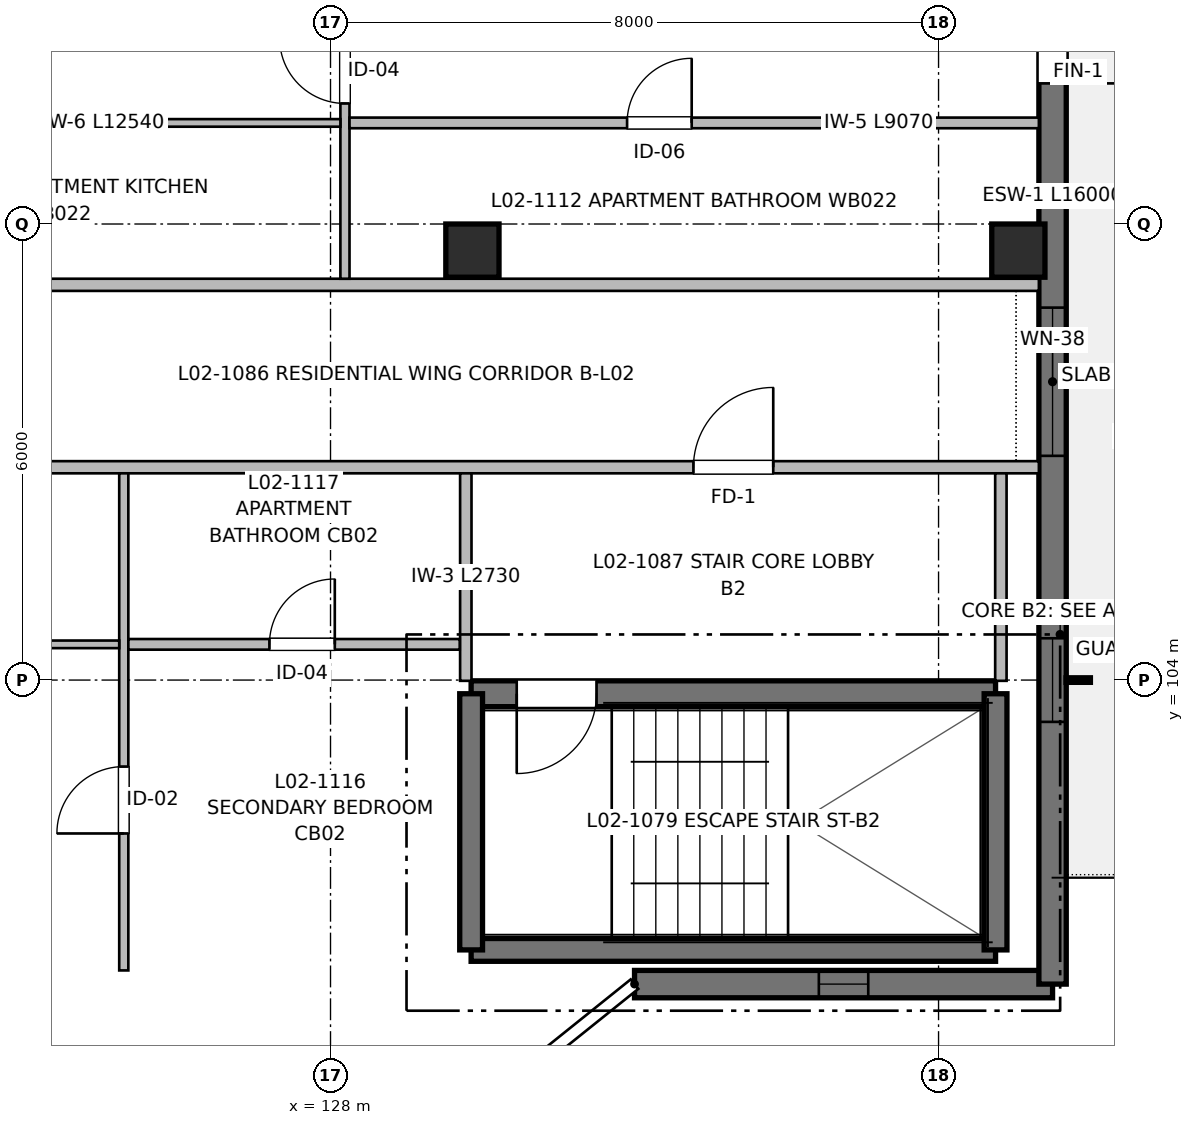
"""IFC4 building model, lengths in metres.
Left out: names, types, materials, properties, quantities, classifications, styles, units other than length and angle.
Written with IfcOpenShell. Run it as: python <this file> out.ifc"""

import sys

from ifc_helpers import new_model, si_unit, direction, frame, frame_2d, origin, origin_2d, place, context, subcontext, project, spatial, rectangle, extrude, element, fill, save


model = new_model("IFC4")
c1 = context("Model", 3, precision=1e-05, world=origin(), true_north=direction((0.0, 1.0)))
c2 = subcontext(c1, "Body", "Model", "MODEL_VIEW")
j1 = project(units=[si_unit("LENGTHUNIT", "METRE"), si_unit("PLANEANGLEUNIT", "RADIAN")], contexts=[c1])
p1 = place(None, origin())
s1 = spatial("IfcSite", under=j1, at=p1, CompositionType="ELEMENT")
p2 = place(p1, origin())
s2 = spatial("IfcBuilding", under=s1, at=p2, CompositionType="ELEMENT")
p3 = place(p2, frame((0.0, 0.0, 7.36)))
s3 = spatial("IfcBuildingStorey", under=s2, at=p3, CompositionType="ELEMENT", Elevation=7.36)
for number, where, z_axis, x_axis in (
    (1, (129.867, 109.65, 0.0), (0.0, 0.0, 1.0), (1.0, 0.0, 0.0)),
    (2, (137.05, 109.65, 0.0), (0.0, 0.0, 1.0), (1.0, 0.0, 0.0)),
):
    element("IfcColumn", number, at=place(p3, frame(where, z_axis=z_axis, x_axis=x_axis)), inside=s3, PredefinedType="COLUMN", context=c2, shape_type="SweptSolid", body=[
        extrude(rectangle(XDim=0.7, YDim=0.7, at=origin_2d()), origin(), (0.0, 0.0, 1.0), 3.2),
    ])
p4 = place(p3, frame((129.85, 100.45, 0.0), z_axis=(0.0, 0.0, 1.0), x_axis=(1.0, 0.0, 0.0)))
e3 = element("IfcWall", 3, at=p4, inside=s3, PredefinedType="SHEAR", context=c2, shape_type="SweptSolid", body=[
    extrude(rectangle(XDim=6.9, YDim=0.3, at=frame_2d((3.45, 0.0))), origin(), (0.0, 0.0, 1.0), 3.2),
])
p5 = place(p3, frame((136.75, 103.82, 0.0), z_axis=(0.0, 0.0, 1.0), x_axis=(-1.0, 0.0, 0.0)))
e4 = element("IfcWall", 4, at=p5, inside=s3, PredefinedType="SHEAR", context=c2, shape_type="SweptSolid", body=[
    extrude(rectangle(XDim=6.9, YDim=0.34, at=frame_2d((3.45, 0.0))), origin(), (0.0, 0.0, 1.0), 3.2),
])
p6 = place(p5, frame((5.25, 0.0, 0.0)))
e5 = element("IfcOpeningElement", 5, at=p6, cuts=e4, PredefinedType="OPENING", context=c2, shape_type="SweptSolid", body=[
    extrude(rectangle(XDim=1.05, YDim=2.15, at=frame_2d((0.525, 1.075))), frame((0.0, 0.18, 0.0), z_axis=(0.0, -1.0, 0.0), x_axis=(1.0, 0.0, 0.0)), (0.0, 0.0, 1.0), 0.36),
])
for number, where, z_axis, x_axis in (
    (6, (129.85, 103.82, 0.0), (0.0, 0.0, 1.0), (0.0, -1.0, 0.0)),
    (7, (136.75, 100.45, 0.0), (0.0, 0.0, 1.0), (0.0, 1.0, 0.0)),
):
    element("IfcWall", number, at=place(p3, frame(where, z_axis=z_axis, x_axis=x_axis)), inside=s3, PredefinedType="SHEAR", context=c2, shape_type="SweptSolid", body=[
        extrude(rectangle(XDim=3.37, YDim=0.3, at=frame_2d((1.685, 0.0))), origin(), (0.0, 0.0, 1.0), 3.2),
    ])
p7 = place(p3, frame((137.5, 100.0, 0.0), z_axis=(0.0, 0.0, 1.0), x_axis=(-1.0, 0.0, 0.0)))
e8 = element("IfcWall", 8, at=p7, inside=s3, PredefinedType="SHEAR", context=c2, shape_type="SweptSolid", body=[
    extrude(rectangle(XDim=5.5, YDim=0.36, at=frame_2d((2.75, 0.0))), origin(), (0.0, 0.0, 1.0), 2.98),
])
p8 = place(p7, frame((2.425, 0.0, 0.9)))
e9 = element("IfcOpeningElement", 9, at=p8, cuts=e8, PredefinedType="OPENING", context=c2, shape_type="SweptSolid", body=[
    extrude(rectangle(XDim=0.65, YDim=0.95, at=frame_2d((0.325, 0.475))), frame((0.0, 0.19, 0.0), z_axis=(0.0, -1.0, 0.0), x_axis=(1.0, 0.0, 0.0)), (0.0, 0.0, 1.0), 0.38),
])
p9 = place(p3, frame((137.5, 116.0, 0.0), z_axis=(0.0, 0.0, 1.0), x_axis=(0.0, -1.0, 0.0)))
e10 = element("IfcWall", 10, at=p9, inside=s3, PredefinedType="SHEAR", context=c2, shape_type="SweptSolid", body=[
    extrude(rectangle(XDim=16.0, YDim=0.36, at=frame_2d((8.0, 0.0))), origin(), (0.0, 0.0, 1.0), 2.98),
])
p10 = place(p9, frame((2.95, 0.0, 0.0)))
e11 = element("IfcOpeningElement", 11, at=p10, cuts=e10, PredefinedType="OPENING", context=c2, shape_type="SweptSolid", body=[
    extrude(rectangle(XDim=1.2, YDim=2.2, at=frame_2d((0.6, 1.1))), frame((0.0, 0.19, 0.0), z_axis=(0.0, -1.0, 0.0), x_axis=(1.0, 0.0, 0.0)), (0.0, 0.0, 1.0), 0.38),
])
p11 = place(p9, frame((7.1, 0.0, 0.72)))
e12 = element("IfcOpeningElement", 12, at=p11, cuts=e10, PredefinedType="OPENING", context=c2, shape_type="SweptSolid", body=[
    extrude(rectangle(XDim=1.95, YDim=1.5, at=frame_2d((0.975, 0.75))), frame((0.0, 0.19, 0.0), z_axis=(0.0, -1.0, 0.0), x_axis=(1.0, 0.0, 0.0)), (0.0, 0.0, 1.0), 0.38),
])
p12 = place(p9, frame((11.45, 0.0, 0.62)))
e13 = element("IfcOpeningElement", 13, at=p12, cuts=e10, PredefinedType="OPENING", context=c2, shape_type="SweptSolid", body=[
    extrude(rectangle(XDim=1.1, YDim=1.6, at=frame_2d((0.55, 0.8))), frame((0.0, 0.19, 0.0), z_axis=(0.0, -1.0, 0.0), x_axis=(1.0, 0.0, 0.0)), (0.0, 0.0, 1.0), 0.38),
])
p13 = place(p3, frame((113.2, 106.8, 0.0), z_axis=(0.0, 0.0, 1.0), x_axis=(1.0, 0.0, 0.0)))
e14 = element("IfcWall", 14, at=p13, inside=s3, PredefinedType="PARTITIONING", context=c2, shape_type="SweptSolid", body=[
    extrude(rectangle(XDim=24.12, YDim=0.16, at=frame_2d((12.06, 0.0))), origin(), (0.0, 0.0, 1.0), 2.935),
])
p14 = place(p13, frame((19.575, 0.0, 0.0)))
e15 = element("IfcOpeningElement", 15, at=p14, cuts=e14, PredefinedType="OPENING", context=c2, shape_type="SweptSolid", body=[
    extrude(rectangle(XDim=1.05, YDim=2.15, at=frame_2d((0.525, 1.075))), frame((0.0, 0.09, 0.0), z_axis=(0.0, -1.0, 0.0), x_axis=(1.0, 0.0, 0.0)), (0.0, 0.0, 1.0), 0.18),
])
p15 = place(p13, frame((8.995, 0.0, 0.0)))
e16 = element("IfcOpeningElement", 16, at=p15, cuts=e14, PredefinedType="OPENING", context=c2, shape_type="SweptSolid", body=[
    extrude(rectangle(XDim=0.98, YDim=2.15, at=frame_2d((0.49, 1.075))), frame((0.0, 0.09, 0.0), z_axis=(0.0, -1.0, 0.0), x_axis=(1.0, 0.0, 0.0)), (0.0, 0.0, 1.0), 0.18),
])
p16 = place(p3, frame((93.68, 109.2, 0.0), z_axis=(0.0, 0.0, 1.0), x_axis=(1.0, 0.0, 0.0)))
e17 = element("IfcWall", 17, at=p16, inside=s3, PredefinedType="PARTITIONING", context=c2, shape_type="SweptSolid", body=[
    extrude(rectangle(XDim=43.64, YDim=0.16, at=frame_2d((21.82, 0.0))), origin(), (0.0, 0.0, 1.0), 2.935),
])
p17 = place(p16, frame((5.41, 0.0, 0.0)))
e18 = element("IfcOpeningElement", 18, at=p17, cuts=e17, PredefinedType="OPENING", context=c2, shape_type="SweptSolid", body=[
    extrude(rectangle(XDim=0.98, YDim=2.15, at=frame_2d((0.49, 1.075))), frame((0.0, 0.09, 0.0), z_axis=(0.0, -1.0, 0.0), x_axis=(1.0, 0.0, 0.0)), (0.0, 0.0, 1.0), 0.18),
])
p18 = place(p16, frame((27.32, 0.0, 0.0)))
e19 = element("IfcOpeningElement", 19, at=p18, cuts=e17, PredefinedType="OPENING", context=c2, shape_type="SweptSolid", body=[
    extrude(rectangle(XDim=0.98, YDim=2.15, at=frame_2d((0.49, 1.075))), frame((0.0, 0.09, 0.0), z_axis=(0.0, -1.0, 0.0), x_axis=(1.0, 0.0, 0.0)), (0.0, 0.0, 1.0), 0.18),
])
for number, where, z_axis, x_axis in (
    (20, (129.78, 103.99, 0.0), (0.0, 0.0, 1.0), (0.0, 1.0, 0.0)),
    (21, (136.82, 103.99, 0.0), (0.0, 0.0, 1.0), (0.0, 1.0, 0.0)),
):
    element("IfcWall", number, at=place(p3, frame(where, z_axis=z_axis, x_axis=x_axis)), inside=s3, PredefinedType="PARTITIONING", context=c2, shape_type="SweptSolid", body=[
        extrude(rectangle(XDim=2.73, YDim=0.15, at=frame_2d((1.365, 0.0))), origin(), (0.0, 0.0, 1.0), 2.935),
    ])
p19 = place(p3, frame((128.19, 109.28, 0.0), z_axis=(0.0, 0.0, 1.0), x_axis=(0.0, 1.0, 0.0)))
e22 = element("IfcWall", 22, at=p19, inside=s3, PredefinedType="PARTITIONING", context=c2, shape_type="SweptSolid", body=[
    extrude(rectangle(XDim=6.59, YDim=0.12, at=frame_2d((3.295, 0.0))), origin(), (0.0, 0.0, 1.0), 2.935),
])
p20 = place(p19, frame((2.306, 0.0, 0.0)))
e23 = element("IfcOpeningElement", 23, at=p20, cuts=e22, PredefinedType="OPENING", context=c2, shape_type="SweptSolid", body=[
    extrude(rectangle(XDim=0.86, YDim=2.1, at=frame_2d((0.43, 1.05))), frame((0.0, 0.07, 0.0), z_axis=(0.0, -1.0, 0.0), x_axis=(1.0, 0.0, 0.0)), (0.0, 0.0, 1.0), 0.14),
])
p21 = place(p19, frame((4.093, 0.0, 0.0)))
e24 = element("IfcOpeningElement", 24, at=p21, cuts=e22, PredefinedType="OPENING", context=c2, shape_type="SweptSolid", body=[
    extrude(rectangle(XDim=0.9, YDim=2.1, at=frame_2d((0.45, 1.05))), frame((0.0, 0.07, 0.0), z_axis=(0.0, -1.0, 0.0), x_axis=(1.0, 0.0, 0.0)), (0.0, 0.0, 1.0), 0.14),
])
p22 = place(p3, frame((128.25, 111.33, 0.0), z_axis=(0.0, 0.0, 1.0), x_axis=(1.0, 0.0, 0.0)))
e25 = element("IfcWall", 25, at=p22, inside=s3, PredefinedType="PARTITIONING", context=c2, shape_type="SweptSolid", body=[
    extrude(rectangle(XDim=9.07, YDim=0.14, at=frame_2d((4.535, 0.0))), origin(), (0.0, 0.0, 1.0), 2.935),
])
p23 = place(p22, frame((3.652, 0.0, 0.0)))
e26 = element("IfcOpeningElement", 26, at=p23, cuts=e25, PredefinedType="OPENING", context=c2, shape_type="SweptSolid", body=[
    extrude(rectangle(XDim=0.85, YDim=2.05, at=frame_2d((0.425, 1.025))), frame((0.0, 0.08, 0.0), z_axis=(0.0, -1.0, 0.0), x_axis=(1.0, 0.0, 0.0)), (0.0, 0.0, 1.0), 0.16),
])
p24 = place(p3, frame((115.59, 111.33, 0.0), z_axis=(0.0, 0.0, 1.0), x_axis=(1.0, 0.0, 0.0)))
e27 = element("IfcWall", 27, at=p24, inside=s3, PredefinedType="PARTITIONING", context=c2, shape_type="SweptSolid", body=[
    extrude(rectangle(XDim=12.54, YDim=0.1, at=frame_2d((6.27, 0.0))), origin(), (0.0, 0.0, 1.0), 2.935),
])
p25 = place(p24, frame((5.04, 0.0, 0.0)))
e28 = element("IfcOpeningElement", 28, at=p25, cuts=e27, PredefinedType="OPENING", context=c2, shape_type="SweptSolid", body=[
    extrude(rectangle(XDim=0.92, YDim=2.1, at=frame_2d((0.46, 1.05))), frame((0.0, 0.06, 0.0), z_axis=(0.0, -1.0, 0.0), x_axis=(1.0, 0.0, 0.0)), (0.0, 0.0, 1.0), 0.12),
])
p26 = place(p3, frame((125.28, 100.18, 0.0), z_axis=(0.0, 0.0, 1.0), x_axis=(0.0, 1.0, 0.0)))
e29 = element("IfcWall", 29, at=p26, inside=s3, PredefinedType="PARTITIONING", context=c2, shape_type="SweptSolid", body=[
    extrude(rectangle(XDim=6.54, YDim=0.12, at=frame_2d((3.27, 0.0))), origin(), (0.0, 0.0, 1.0), 2.935),
])
p27 = place(p26, frame((1.802, 0.0, 0.0)))
e30 = element("IfcOpeningElement", 30, at=p27, cuts=e29, PredefinedType="OPENING", context=c2, shape_type="SweptSolid", body=[
    extrude(rectangle(XDim=0.88, YDim=2.1, at=frame_2d((0.44, 1.05))), frame((0.0, 0.07, 0.0), z_axis=(0.0, -1.0, 0.0), x_axis=(1.0, 0.0, 0.0)), (0.0, 0.0, 1.0), 0.14),
])
p28 = place(p3, frame((125.34, 104.47, 0.0), z_axis=(0.0, 0.0, 1.0), x_axis=(1.0, 0.0, 0.0)))
e31 = element("IfcWall", 31, at=p28, inside=s3, PredefinedType="PARTITIONING", context=c2, shape_type="SweptSolid", body=[
    extrude(rectangle(XDim=4.36, YDim=0.14, at=frame_2d((2.18, 0.0))), origin(), (0.0, 0.0, 1.0), 2.935),
])
p29 = place(p28, frame((1.856, 0.0, 0.0)))
e32 = element("IfcOpeningElement", 32, at=p29, cuts=e31, PredefinedType="OPENING", context=c2, shape_type="SweptSolid", body=[
    extrude(rectangle(XDim=0.86, YDim=2.1, at=frame_2d((0.43, 1.05))), frame((0.0, 0.08, 0.0), z_axis=(0.0, -1.0, 0.0), x_axis=(1.0, 0.0, 0.0)), (0.0, 0.0, 1.0), 0.16),
])
p30 = place(p3, frame((120.09, 104.47, 0.0), z_axis=(0.0, 0.0, 1.0), x_axis=(1.0, 0.0, 0.0)))
e33 = element("IfcWall", 33, at=p30, inside=s3, PredefinedType="PARTITIONING", context=c2, shape_type="SweptSolid", body=[
    extrude(rectangle(XDim=5.13, YDim=0.1, at=frame_2d((2.565, 0.0))), origin(), (0.0, 0.0, 1.0), 2.935),
])
p31 = place(p30, frame((2.18, 0.0, 0.0)))
e34 = element("IfcOpeningElement", 34, at=p31, cuts=e33, PredefinedType="OPENING", context=c2, shape_type="SweptSolid", body=[
    extrude(rectangle(XDim=0.92, YDim=2.1, at=frame_2d((0.46, 1.05))), frame((0.0, 0.06, 0.0), z_axis=(0.0, -1.0, 0.0), x_axis=(1.0, 0.0, 0.0)), (0.0, 0.0, 1.0), 0.12),
])
p32 = place(p6, origin())
e35 = element("IfcDoor", 35, at=p32, inside=s3, OperationType="SINGLE_SWING_RIGHT", PredefinedType="DOOR", context=c2, shape_type="SweptSolid", body=[
    extrude(rectangle(XDim=1.05, YDim=2.15, at=frame_2d((0.525, 1.075))), frame((0.0, 0.025, 0.0), z_axis=(0.0, -1.0, 0.0), x_axis=(1.0, 0.0, 0.0)), (0.0, 0.0, 1.0), 0.05),
])
fill(e5, e35)
p33 = place(p8, origin())
e36 = element("IfcWindow", 36, at=p33, inside=s3, PartitioningType="SINGLE_PANEL", PredefinedType="WINDOW", context=c2, shape_type="SweptSolid", body=[
    extrude(rectangle(XDim=0.65, YDim=0.95, at=frame_2d((0.325, 0.475))), frame((0.0, 0.03, 0.0), z_axis=(0.0, -1.0, 0.0), x_axis=(1.0, 0.0, 0.0)), (0.0, 0.0, 1.0), 0.06),
])
fill(e9, e36)
p34 = place(p10, origin())
e37 = element("IfcDoor", 37, at=p34, inside=s3, OperationType="SINGLE_SWING_RIGHT", PredefinedType="DOOR", context=c2, shape_type="SweptSolid", body=[
    extrude(rectangle(XDim=1.2, YDim=2.2, at=frame_2d((0.6, 1.1))), frame((0.0, 0.025, 0.0), z_axis=(0.0, -1.0, 0.0), x_axis=(1.0, 0.0, 0.0)), (0.0, 0.0, 1.0), 0.05),
])
fill(e11, e37)
p35 = place(p11, origin())
e38 = element("IfcWindow", 38, at=p35, inside=s3, PartitioningType="SINGLE_PANEL", PredefinedType="WINDOW", context=c2, shape_type="SweptSolid", body=[
    extrude(rectangle(XDim=1.95, YDim=1.5, at=frame_2d((0.975, 0.75))), frame((0.0, 0.03, 0.0), z_axis=(0.0, -1.0, 0.0), x_axis=(1.0, 0.0, 0.0)), (0.0, 0.0, 1.0), 0.06),
])
fill(e12, e38)
p36 = place(p12, origin())
e39 = element("IfcWindow", 39, at=p36, inside=s3, PartitioningType="SINGLE_PANEL", PredefinedType="WINDOW", context=c2, shape_type="SweptSolid", body=[
    extrude(rectangle(XDim=1.1, YDim=1.6, at=frame_2d((0.55, 0.8))), frame((0.0, 0.03, 0.0), z_axis=(0.0, -1.0, 0.0), x_axis=(1.0, 0.0, 0.0)), (0.0, 0.0, 1.0), 0.06),
])
fill(e13, e39)
p37 = place(p14, origin())
e40 = element("IfcDoor", 40, at=p37, inside=s3, OperationType="SINGLE_SWING_RIGHT", PredefinedType="DOOR", context=c2, shape_type="SweptSolid", body=[
    extrude(rectangle(XDim=1.05, YDim=2.15, at=frame_2d((0.525, 1.075))), frame((0.0, 0.025, 0.0), z_axis=(0.0, -1.0, 0.0), x_axis=(1.0, 0.0, 0.0)), (0.0, 0.0, 1.0), 0.05),
])
fill(e15, e40)
p38 = place(p20, origin())
e41 = element("IfcDoor", 41, at=p38, inside=s3, OperationType="SINGLE_SWING_RIGHT", PredefinedType="DOOR", context=c2, shape_type="SweptSolid", body=[
    extrude(rectangle(XDim=0.86, YDim=2.1, at=frame_2d((0.43, 1.05))), frame((0.0, 0.025, 0.0), z_axis=(0.0, -1.0, 0.0), x_axis=(1.0, 0.0, 0.0)), (0.0, 0.0, 1.0), 0.05),
])
fill(e23, e41)
p39 = place(p23, origin())
e42 = element("IfcDoor", 42, at=p39, inside=s3, OperationType="SINGLE_SWING_RIGHT", PredefinedType="DOOR", context=c2, shape_type="SweptSolid", body=[
    extrude(rectangle(XDim=0.85, YDim=2.05, at=frame_2d((0.425, 1.025))), frame((0.0, 0.025, 0.0), z_axis=(0.0, -1.0, 0.0), x_axis=(1.0, 0.0, 0.0)), (0.0, 0.0, 1.0), 0.05),
])
fill(e26, e42)
p40 = place(p27, origin())
e43 = element("IfcDoor", 43, at=p40, inside=s3, OperationType="SINGLE_SWING_LEFT", PredefinedType="DOOR", context=c2, shape_type="SweptSolid", body=[
    extrude(rectangle(XDim=0.88, YDim=2.1, at=frame_2d((0.44, 1.05))), frame((0.0, 0.025, 0.0), z_axis=(0.0, -1.0, 0.0), x_axis=(1.0, 0.0, 0.0)), (0.0, 0.0, 1.0), 0.05),
])
fill(e30, e43)
p41 = place(p29, origin())
e44 = element("IfcDoor", 44, at=p41, inside=s3, OperationType="SINGLE_SWING_RIGHT", PredefinedType="DOOR", context=c2, shape_type="SweptSolid", body=[
    extrude(rectangle(XDim=0.86, YDim=2.1, at=frame_2d((0.43, 1.05))), frame((0.0, 0.025, 0.0), z_axis=(0.0, -1.0, 0.0), x_axis=(1.0, 0.0, 0.0)), (0.0, 0.0, 1.0), 0.05),
])
fill(e32, e44)
save(model, sys.argv[1])
